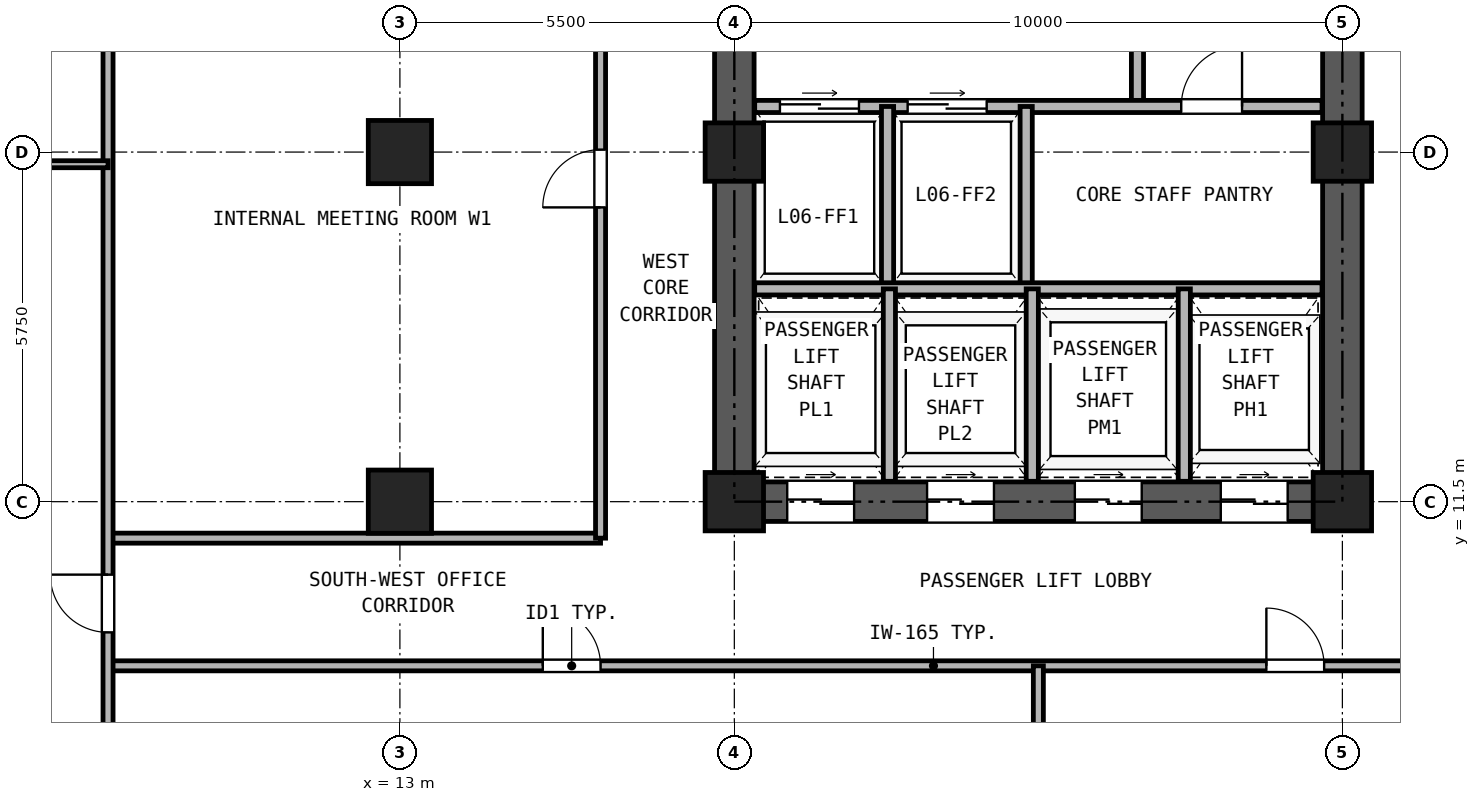
"""IFC4 building model, lengths in metres.
Left out: names, types, materials, properties, quantities, classifications, styles, units other than length and angle.
Written with IfcOpenShell. Run it as: python <this file> out.ifc"""

import sys

from ifc_helpers import new_model, si_unit, direction, frame, frame_2d, origin, origin_2d, place, context, subcontext, project, spatial, rectangle, hollow_rectangle, extrude, source, transform, mapped, element, fill, save


model = new_model("IFC4")
c1 = context("Model", 3, precision=1e-05, world=origin(), true_north=direction((0.0, 1.0)))
c2 = subcontext(c1, "Body", "Model", "MODEL_VIEW")
j1 = project(units=[si_unit("LENGTHUNIT", "METRE"), si_unit("PLANEANGLEUNIT", "RADIAN")], contexts=[c1])
p1 = place(None, origin())
s1 = spatial("IfcSite", under=j1, at=p1, CompositionType="ELEMENT")
p2 = place(p1, origin())
s2 = spatial("IfcBuilding", under=s1, at=p2, CompositionType="ELEMENT")
p3 = place(p2, frame((0.0, 0.0, 26.1)))
s3 = spatial("IfcBuildingStorey", under=s2, at=p3, CompositionType="ELEMENT", Elevation=26.1)
m1 = source(origin(), c2, "Body", "SweptSolid", [
    extrude(hollow_rectangle(XDim=1.04, YDim=1.04, WallThickness=0.065, at=origin_2d()), origin(), (0.0, 0.0, 1.0), 3.32),
])
for number, where, z_axis, x_axis in (
    (1, (13.0, 11.5, 0.0), (0.0, 0.0, 1.0), (1.0, 0.0, 0.0)),
    (2, (13.0, 17.25, 0.0), (0.0, 0.0, 1.0), (1.0, 0.0, 0.0)),
):
    element("IfcColumn", number, at=place(p3, frame(where, z_axis=z_axis, x_axis=x_axis)), inside=s3, PredefinedType="COLUMN", context=c2, shape_type="MappedRepresentation", body=[
        mapped(m1, transform((0.0, 0.0, 0.0), x_axis=(1.0, 0.0, 0.0), y_axis=(0.0, 1.0, 0.0), z_axis=(0.0, 0.0, 1.0), scale=1.0)),
    ])
m2 = source(origin(), c2, "Body", "SweptSolid", [
    extrude(hollow_rectangle(XDim=0.96, YDim=0.96, WallThickness=0.06, at=origin_2d()), origin(), (0.0, 0.0, 1.0), 3.32),
])
for number, where, z_axis, x_axis in (
    (3, (18.5, 11.5, 0.0), (0.0, 0.0, 1.0), (1.0, 0.0, 0.0)),
    (4, (18.5, 17.25, 0.0), (0.0, 0.0, 1.0), (1.0, 0.0, 0.0)),
    (5, (28.5, 11.5, 0.0), (0.0, 0.0, 1.0), (1.0, 0.0, 0.0)),
    (6, (28.5, 17.25, 0.0), (0.0, 0.0, 1.0), (1.0, 0.0, 0.0)),
):
    element("IfcColumn", number, at=place(p3, frame(where, z_axis=z_axis, x_axis=x_axis)), inside=s3, PredefinedType="COLUMN", context=c2, shape_type="MappedRepresentation", body=[
        mapped(m2, transform((0.0, 0.0, 0.0), x_axis=(1.0, 0.0, 0.0), y_axis=(0.0, 1.0, 0.0), z_axis=(0.0, 0.0, 1.0), scale=1.0)),
    ])
p4 = place(p3, frame((18.175, 11.5, 0.0), z_axis=(0.0, 0.0, 1.0), x_axis=(1.0, 0.0, 0.0)))
e7 = element("IfcWall", 7, at=p4, inside=s3, PredefinedType="SHEAR", context=c2, shape_type="SweptSolid", body=[
    extrude(rectangle(XDim=10.65, YDim=0.65, at=frame_2d((5.325, 0.0))), origin(), (0.0, 0.0, 1.0), 3.32),
])
p5 = place(p4, frame((1.195, 0.0, 0.0)))
e8 = element("IfcOpeningElement", 8, at=p5, cuts=e7, PredefinedType="OPENING", context=c2, shape_type="SweptSolid", body=[
    extrude(rectangle(XDim=1.1, YDim=2.25, at=frame_2d((0.55, 1.125))), frame((0.0, 0.335, 0.0), z_axis=(0.0, -1.0, 0.0), x_axis=(1.0, 0.0, 0.0)), (0.0, 0.0, 1.0), 0.67),
])
p6 = place(p4, frame((3.495, 0.0, 0.0)))
e9 = element("IfcOpeningElement", 9, at=p6, cuts=e7, PredefinedType="OPENING", context=c2, shape_type="SweptSolid", body=[
    extrude(rectangle(XDim=1.1, YDim=2.25, at=frame_2d((0.55, 1.125))), frame((0.0, 0.335, 0.0), z_axis=(0.0, -1.0, 0.0), x_axis=(1.0, 0.0, 0.0)), (0.0, 0.0, 1.0), 0.67),
])
p7 = place(p4, frame((5.925, 0.0, 0.0)))
e10 = element("IfcOpeningElement", 10, at=p7, cuts=e7, PredefinedType="OPENING", context=c2, shape_type="SweptSolid", body=[
    extrude(rectangle(XDim=1.1, YDim=2.25, at=frame_2d((0.55, 1.125))), frame((0.0, 0.335, 0.0), z_axis=(0.0, -1.0, 0.0), x_axis=(1.0, 0.0, 0.0)), (0.0, 0.0, 1.0), 0.67),
])
p8 = place(p4, frame((8.325, 0.0, 0.0)))
e11 = element("IfcOpeningElement", 11, at=p8, cuts=e7, PredefinedType="OPENING", context=c2, shape_type="SweptSolid", body=[
    extrude(rectangle(XDim=1.1, YDim=2.25, at=frame_2d((0.55, 1.125))), frame((0.0, 0.335, 0.0), z_axis=(0.0, -1.0, 0.0), x_axis=(1.0, 0.0, 0.0)), (0.0, 0.0, 1.0), 0.67),
])
p9 = place(p3, frame((18.5, 11.825, 0.0), z_axis=(0.0, 0.0, 1.0), x_axis=(0.0, 1.0, 0.0)))
e12 = element("IfcWall", 12, at=p9, inside=s3, PredefinedType="SHEAR", context=c2, shape_type="SweptSolid", body=[
    extrude(rectangle(XDim=16.6, YDim=0.65, at=frame_2d((8.3, 0.0))), origin(), (0.0, 0.0, 1.0), 3.32),
])
p10 = place(p9, frame((7.325, 0.0, 0.0)))
e13 = element("IfcOpeningElement", 13, at=p10, cuts=e12, PredefinedType="OPENING", context=c2, shape_type="SweptSolid", body=[
    extrude(rectangle(XDim=1.15, YDim=2.2, at=frame_2d((0.575, 1.1))), frame((0.0, 0.335, 0.0), z_axis=(0.0, -1.0, 0.0), x_axis=(1.0, 0.0, 0.0)), (0.0, 0.0, 1.0), 0.67),
])
p11 = place(p3, frame((28.5, 11.825, 0.0), z_axis=(0.0, 0.0, 1.0), x_axis=(0.0, 1.0, 0.0)))
e14 = element("IfcWall", 14, at=p11, inside=s3, PredefinedType="SHEAR", context=c2, shape_type="SweptSolid", body=[
    extrude(rectangle(XDim=16.6, YDim=0.65, at=frame_2d((8.3, 0.0))), origin(), (0.0, 0.0, 1.0), 3.32),
])
p12 = place(p11, frame((7.325, 0.0, 0.0)))
e15 = element("IfcOpeningElement", 15, at=p12, cuts=e14, PredefinedType="OPENING", context=c2, shape_type="SweptSolid", body=[
    extrude(rectangle(XDim=1.15, YDim=2.2, at=frame_2d((0.575, 1.1))), frame((0.0, 0.335, 0.0), z_axis=(0.0, -1.0, 0.0), x_axis=(1.0, 0.0, 0.0)), (0.0, 0.0, 1.0), 0.67),
])
p13 = place(p3, frame((25.13, 18.0, 0.0), z_axis=(0.0, 0.0, 1.0), x_axis=(0.0, 1.0, 0.0)))
e16 = element("IfcWall", 16, at=p13, inside=s3, PredefinedType="PARTITIONING", context=c2, shape_type="SweptSolid", body=[
    extrude(rectangle(XDim=3.39, YDim=0.2, at=frame_2d((1.695, 0.0))), origin(), (0.0, 0.0, 1.0), 3.32),
])
p14 = place(p13, frame((1.1, 0.0, 0.0)))
e17 = element("IfcOpeningElement", 17, at=p14, cuts=e16, PredefinedType="OPENING", context=c2, shape_type="SweptSolid", body=[
    extrude(rectangle(XDim=1.15, YDim=2.2, at=frame_2d((0.575, 1.1))), frame((0.0, 0.11, 0.0), z_axis=(0.0, -1.0, 0.0), x_axis=(1.0, 0.0, 0.0)), (0.0, 0.0, 1.0), 0.22),
])
p15 = place(p3, frame((18.835, 18.0, 0.0), z_axis=(0.0, 0.0, 1.0), x_axis=(1.0, 0.0, 0.0)))
e18 = element("IfcWall", 18, at=p15, inside=s3, PredefinedType="PARTITIONING", context=c2, shape_type="SweptSolid", body=[
    extrude(rectangle(XDim=9.33, YDim=0.2, at=frame_2d((4.665, 0.0))), origin(), (0.0, 0.0, 1.0), 3.32),
])
p16 = place(p15, frame((0.415, 0.0, 0.0)))
e19 = element("IfcOpeningElement", 19, at=p16, cuts=e18, PredefinedType="OPENING", context=c2, shape_type="SweptSolid", body=[
    extrude(rectangle(XDim=1.3, YDim=2.3, at=frame_2d((0.65, 1.15))), frame((0.0, 0.11, 0.0), z_axis=(0.0, -1.0, 0.0), x_axis=(1.0, 0.0, 0.0)), (0.0, 0.0, 1.0), 0.22),
])
p17 = place(p15, frame((2.515, 0.0, 0.0)))
e20 = element("IfcOpeningElement", 20, at=p17, cuts=e18, PredefinedType="OPENING", context=c2, shape_type="SweptSolid", body=[
    extrude(rectangle(XDim=1.3, YDim=2.3, at=frame_2d((0.65, 1.15))), frame((0.0, 0.11, 0.0), z_axis=(0.0, -1.0, 0.0), x_axis=(1.0, 0.0, 0.0)), (0.0, 0.0, 1.0), 0.22),
])
p18 = place(p15, frame((7.015, 0.0, 0.0)))
e21 = element("IfcOpeningElement", 21, at=p18, cuts=e18, PredefinedType="OPENING", context=c2, shape_type="SweptSolid", body=[
    extrude(rectangle(XDim=1.0, YDim=2.15, at=frame_2d((0.5, 1.075))), frame((0.0, 0.11, 0.0), z_axis=(0.0, -1.0, 0.0), x_axis=(1.0, 0.0, 0.0)), (0.0, 0.0, 1.0), 0.22),
])
for number, where, z_axis, x_axis in (
    (22, (21.02, 15.0, 0.0), (0.0, 0.0, 1.0), (0.0, 1.0, 0.0)),
    (23, (23.3, 15.0, 0.0), (0.0, 0.0, 1.0), (0.0, 1.0, 0.0)),
):
    element("IfcWall", number, at=place(p3, frame(where, z_axis=z_axis, x_axis=x_axis)), inside=s3, PredefinedType="PARTITIONING", context=c2, shape_type="SweptSolid", body=[
        extrude(rectangle(XDim=3.0, YDim=0.2, at=frame_2d((1.5, 0.0))), origin(), (0.0, 0.0, 1.0), 3.32),
    ])
p19 = place(p3, frame((18.835, 15.0, 0.0), z_axis=(0.0, 0.0, 1.0), x_axis=(1.0, 0.0, 0.0)))
e24 = element("IfcWall", 24, at=p19, inside=s3, PredefinedType="PARTITIONING", context=c2, shape_type="SweptSolid", body=[
    extrude(rectangle(XDim=9.33, YDim=0.2, at=frame_2d((4.665, 0.0))), origin(), (0.0, 0.0, 1.0), 3.32),
])
for number, where, z_axis, x_axis in (
    (25, (21.05, 11.835, 0.0), (0.0, 0.0, 1.0), (0.0, 1.0, 0.0)),
    (26, (23.4, 11.835, 0.0), (0.0, 0.0, 1.0), (0.0, 1.0, 0.0)),
    (27, (25.9, 11.835, 0.0), (0.0, 0.0, 1.0), (0.0, 1.0, 0.0)),
):
    element("IfcWall", number, at=place(p3, frame(where, z_axis=z_axis, x_axis=x_axis)), inside=s3, PredefinedType="PARTITIONING", context=c2, shape_type="SweptSolid", body=[
        extrude(rectangle(XDim=3.165, YDim=0.2, at=frame_2d((1.583, 0.0))), origin(), (0.0, 0.0, 1.0), 3.32),
    ])
p20 = place(p3, frame((8.2, 8.8, 0.0), z_axis=(0.0, 0.0, 1.0), x_axis=(1.0, 0.0, 0.0)))
e28 = element("IfcWall", 28, at=p20, inside=s3, PredefinedType="PARTITIONING", context=c2, shape_type="SweptSolid", body=[
    extrude(rectangle(XDim=30.6, YDim=0.165, at=frame_2d((15.3, 0.0))), origin(), (0.0, 0.0, 1.0), 3.32),
])
p21 = place(p20, frame((7.15, 0.0, 0.0)))
e29 = element("IfcOpeningElement", 29, at=p21, cuts=e28, PredefinedType="OPENING", context=c2, shape_type="SweptSolid", body=[
    extrude(rectangle(XDim=0.95, YDim=2.15, at=frame_2d((0.475, 1.075))), frame((0.0, 0.093, 0.0), z_axis=(0.0, -1.0, 0.0), x_axis=(1.0, 0.0, 0.0)), (0.0, 0.0, 1.0), 0.185),
])
p22 = place(p20, frame((19.05, 0.0, 0.0)))
e30 = element("IfcOpeningElement", 30, at=p22, cuts=e28, PredefinedType="OPENING", context=c2, shape_type="SweptSolid", body=[
    extrude(rectangle(XDim=0.95, YDim=2.15, at=frame_2d((0.475, 1.075))), frame((0.0, 0.093, 0.0), z_axis=(0.0, -1.0, 0.0), x_axis=(1.0, 0.0, 0.0)), (0.0, 0.0, 1.0), 0.185),
])
p23 = place(p20, frame((24.3, 0.0, 0.0)))
e31 = element("IfcOpeningElement", 31, at=p23, cuts=e28, PredefinedType="OPENING", context=c2, shape_type="SweptSolid", body=[
    extrude(rectangle(XDim=0.95, YDim=2.15, at=frame_2d((0.475, 1.075))), frame((0.0, 0.093, 0.0), z_axis=(0.0, -1.0, 0.0), x_axis=(1.0, 0.0, 0.0)), (0.0, 0.0, 1.0), 0.185),
])
p24 = place(p20, frame((26.5, 0.0, 0.0)))
e32 = element("IfcOpeningElement", 32, at=p24, cuts=e28, PredefinedType="OPENING", context=c2, shape_type="SweptSolid", body=[
    extrude(rectangle(XDim=0.92, YDim=2.1, at=frame_2d((0.46, 1.05))), frame((0.0, 0.093, 0.0), z_axis=(0.0, -1.0, 0.0), x_axis=(1.0, 0.0, 0.0)), (0.0, 0.0, 1.0), 0.185),
])
p25 = place(p20, frame((28.9, 0.0, 0.0)))
e33 = element("IfcOpeningElement", 33, at=p25, cuts=e28, PredefinedType="OPENING", context=c2, shape_type="SweptSolid", body=[
    extrude(rectangle(XDim=0.92, YDim=2.1, at=frame_2d((0.46, 1.05))), frame((0.0, 0.093, 0.0), z_axis=(0.0, -1.0, 0.0), x_axis=(1.0, 0.0, 0.0)), (0.0, 0.0, 1.0), 0.185),
])
p26 = place(p3, frame((8.2, 10.9, 0.0), z_axis=(0.0, 0.0, 1.0), x_axis=(1.0, 0.0, 0.0)))
e34 = element("IfcWall", 34, at=p26, inside=s3, PredefinedType="PARTITIONING", context=c2, shape_type="SweptSolid", body=[
    extrude(rectangle(XDim=8.1, YDim=0.165, at=frame_2d((4.05, 0.0))), origin(), (0.0, 0.0, 1.0), 3.32),
])
p27 = place(p3, frame((16.3, 10.9, 0.0), z_axis=(0.0, 0.0, 1.0), x_axis=(0.0, 1.0, 0.0)))
e35 = element("IfcWall", 35, at=p27, inside=s3, PredefinedType="PARTITIONING", context=c2, shape_type="SweptSolid", body=[
    extrude(rectangle(XDim=18.35, YDim=0.165, at=frame_2d((9.175, 0.0))), origin(), (0.0, 0.0, 1.0), 3.32),
])
p28 = place(p27, frame((5.44, 0.0, 0.0)))
e36 = element("IfcOpeningElement", 36, at=p28, cuts=e35, PredefinedType="OPENING", context=c2, shape_type="SweptSolid", body=[
    extrude(rectangle(XDim=0.95, YDim=2.15, at=frame_2d((0.475, 1.075))), frame((0.0, 0.093, 0.0), z_axis=(0.0, -1.0, 0.0), x_axis=(1.0, 0.0, 0.0)), (0.0, 0.0, 1.0), 0.185),
])
p29 = place(p27, frame((14.616, 0.0, 0.0)))
e37 = element("IfcOpeningElement", 37, at=p29, cuts=e35, PredefinedType="OPENING", context=c2, shape_type="SweptSolid", body=[
    extrude(rectangle(XDim=0.95, YDim=2.15, at=frame_2d((0.475, 1.075))), frame((0.0, 0.093, 0.0), z_axis=(0.0, -1.0, 0.0), x_axis=(1.0, 0.0, 0.0)), (0.0, 0.0, 1.0), 0.185),
])
p30 = place(p3, frame((8.2, 0.16, 0.0), z_axis=(0.0, 0.0, 1.0), x_axis=(0.0, 1.0, 0.0)))
e38 = element("IfcWall", 38, at=p30, inside=s3, PredefinedType="PARTITIONING", context=c2, shape_type="SweptSolid", body=[
    extrude(rectangle(XDim=40.18, YDim=0.165, at=frame_2d((20.09, 0.0))), origin(), (0.0, 0.0, 1.0), 3.32),
])
p31 = place(p30, frame((9.19, 0.0, 0.0)))
e39 = element("IfcOpeningElement", 39, at=p31, cuts=e38, PredefinedType="OPENING", context=c2, shape_type="SweptSolid", body=[
    extrude(rectangle(XDim=0.95, YDim=2.15, at=frame_2d((0.475, 1.075))), frame((0.0, 0.093, 0.0), z_axis=(0.0, -1.0, 0.0), x_axis=(1.0, 0.0, 0.0)), (0.0, 0.0, 1.0), 0.185),
])
p32 = place(p30, frame((29.64, 0.0, 0.0)))
e40 = element("IfcOpeningElement", 40, at=p32, cuts=e38, PredefinedType="OPENING", context=c2, shape_type="SweptSolid", body=[
    extrude(rectangle(XDim=0.95, YDim=2.15, at=frame_2d((0.475, 1.075))), frame((0.0, 0.093, 0.0), z_axis=(0.0, -1.0, 0.0), x_axis=(1.0, 0.0, 0.0)), (0.0, 0.0, 1.0), 0.185),
])
p33 = place(p3, frame((23.5, 0.16, 0.0), z_axis=(0.0, 0.0, 1.0), x_axis=(0.0, 1.0, 0.0)))
e41 = element("IfcWall", 41, at=p33, inside=s3, PredefinedType="PARTITIONING", context=c2, shape_type="SweptSolid", body=[
    extrude(rectangle(XDim=8.64, YDim=0.165, at=frame_2d((4.32, 0.0))), origin(), (0.0, 0.0, 1.0), 3.32),
])
p34 = place(p3, frame((0.16, 17.05, 0.0), z_axis=(0.0, 0.0, 1.0), x_axis=(1.0, 0.0, 0.0)))
e42 = element("IfcWall", 42, at=p34, inside=s3, PredefinedType="PARTITIONING", context=c2, shape_type="SweptSolid", body=[
    extrude(rectangle(XDim=8.04, YDim=0.115, at=frame_2d((4.02, 0.0))), origin(), (0.0, 0.0, 1.0), 2.539),
])
p35 = place(p16, origin())
e43 = element("IfcDoor", 43, at=p35, inside=s3, OperationType="DOUBLE_DOOR_SLIDING", PredefinedType="DOOR", context=c2, shape_type="SweptSolid", body=[
    extrude(rectangle(XDim=1.3, YDim=2.3, at=frame_2d((0.65, 1.15))), frame((0.0, 0.025, 0.0), z_axis=(0.0, -1.0, 0.0), x_axis=(1.0, 0.0, 0.0)), (0.0, 0.0, 1.0), 0.05),
])
fill(e19, e43)
p36 = place(p17, origin())
e44 = element("IfcDoor", 44, at=p36, inside=s3, OperationType="DOUBLE_DOOR_SLIDING", PredefinedType="DOOR", context=c2, shape_type="SweptSolid", body=[
    extrude(rectangle(XDim=1.3, YDim=2.3, at=frame_2d((0.65, 1.15))), frame((0.0, 0.025, 0.0), z_axis=(0.0, -1.0, 0.0), x_axis=(1.0, 0.0, 0.0)), (0.0, 0.0, 1.0), 0.05),
])
fill(e20, e44)
p37 = place(p18, frame((1.0, 0.0, 0.0), z_axis=(0.0, 0.0, 1.0), x_axis=(-1.0, 0.0, 0.0)))
e45 = element("IfcDoor", 45, at=p37, inside=s3, OperationType="SINGLE_SWING_RIGHT", PredefinedType="DOOR", context=c2, shape_type="SweptSolid", body=[
    extrude(rectangle(XDim=1.0, YDim=2.15, at=frame_2d((0.5, 1.075))), frame((0.0, 0.025, 0.0), z_axis=(0.0, -1.0, 0.0), x_axis=(1.0, 0.0, 0.0)), (0.0, 0.0, 1.0), 0.05),
])
fill(e21, e45)
p38 = place(p5, frame((1.1, 0.0, 0.0), z_axis=(0.0, 0.0, 1.0), x_axis=(-1.0, 0.0, 0.0)))
e46 = element("IfcDoor", 46, at=p38, inside=s3, OperationType="DOUBLE_DOOR_SLIDING", PredefinedType="DOOR", context=c2, shape_type="SweptSolid", body=[
    extrude(rectangle(XDim=1.1, YDim=2.25, at=frame_2d((0.55, 1.125))), frame((0.0, 0.025, 0.0), z_axis=(0.0, -1.0, 0.0), x_axis=(1.0, 0.0, 0.0)), (0.0, 0.0, 1.0), 0.05),
])
fill(e8, e46)
p39 = place(p6, frame((1.1, 0.0, 0.0), z_axis=(0.0, 0.0, 1.0), x_axis=(-1.0, 0.0, 0.0)))
e47 = element("IfcDoor", 47, at=p39, inside=s3, OperationType="DOUBLE_DOOR_SLIDING", PredefinedType="DOOR", context=c2, shape_type="SweptSolid", body=[
    extrude(rectangle(XDim=1.1, YDim=2.25, at=frame_2d((0.55, 1.125))), frame((0.0, 0.025, 0.0), z_axis=(0.0, -1.0, 0.0), x_axis=(1.0, 0.0, 0.0)), (0.0, 0.0, 1.0), 0.05),
])
fill(e9, e47)
p40 = place(p7, frame((1.1, 0.0, 0.0), z_axis=(0.0, 0.0, 1.0), x_axis=(-1.0, 0.0, 0.0)))
e48 = element("IfcDoor", 48, at=p40, inside=s3, OperationType="DOUBLE_DOOR_SLIDING", PredefinedType="DOOR", context=c2, shape_type="SweptSolid", body=[
    extrude(rectangle(XDim=1.1, YDim=2.25, at=frame_2d((0.55, 1.125))), frame((0.0, 0.025, 0.0), z_axis=(0.0, -1.0, 0.0), x_axis=(1.0, 0.0, 0.0)), (0.0, 0.0, 1.0), 0.05),
])
fill(e10, e48)
p41 = place(p8, frame((1.1, 0.0, 0.0), z_axis=(0.0, 0.0, 1.0), x_axis=(-1.0, 0.0, 0.0)))
e49 = element("IfcDoor", 49, at=p41, inside=s3, OperationType="DOUBLE_DOOR_SLIDING", PredefinedType="DOOR", context=c2, shape_type="SweptSolid", body=[
    extrude(rectangle(XDim=1.1, YDim=2.25, at=frame_2d((0.55, 1.125))), frame((0.0, 0.025, 0.0), z_axis=(0.0, -1.0, 0.0), x_axis=(1.0, 0.0, 0.0)), (0.0, 0.0, 1.0), 0.05),
])
fill(e11, e49)
p42 = place(p21, frame((0.95, 0.0, 0.0), z_axis=(0.0, 0.0, 1.0), x_axis=(-1.0, 0.0, 0.0)))
e50 = element("IfcDoor", 50, at=p42, inside=s3, OperationType="SINGLE_SWING_LEFT", PredefinedType="DOOR", context=c2, shape_type="SweptSolid", body=[
    extrude(rectangle(XDim=0.95, YDim=2.15, at=frame_2d((0.475, 1.075))), frame((0.0, 0.025, 0.0), z_axis=(0.0, -1.0, 0.0), x_axis=(1.0, 0.0, 0.0)), (0.0, 0.0, 1.0), 0.05),
])
fill(e29, e50)
p43 = place(p22, frame((0.95, 0.0, 0.0), z_axis=(0.0, 0.0, 1.0), x_axis=(-1.0, 0.0, 0.0)))
e51 = element("IfcDoor", 51, at=p43, inside=s3, OperationType="SINGLE_SWING_LEFT", PredefinedType="DOOR", context=c2, shape_type="SweptSolid", body=[
    extrude(rectangle(XDim=0.95, YDim=2.15, at=frame_2d((0.475, 1.075))), frame((0.0, 0.025, 0.0), z_axis=(0.0, -1.0, 0.0), x_axis=(1.0, 0.0, 0.0)), (0.0, 0.0, 1.0), 0.05),
])
fill(e30, e51)
p44 = place(p31, frame((0.95, 0.0, 0.0), z_axis=(0.0, 0.0, 1.0), x_axis=(-1.0, 0.0, 0.0)))
e52 = element("IfcDoor", 52, at=p44, inside=s3, OperationType="SINGLE_SWING_RIGHT", PredefinedType="DOOR", context=c2, shape_type="SweptSolid", body=[
    extrude(rectangle(XDim=0.95, YDim=2.15, at=frame_2d((0.475, 1.075))), frame((0.0, 0.025, 0.0), z_axis=(0.0, -1.0, 0.0), x_axis=(1.0, 0.0, 0.0)), (0.0, 0.0, 1.0), 0.05),
])
fill(e39, e52)
p45 = place(p28, frame((0.95, 0.0, 0.0), z_axis=(0.0, 0.0, 1.0), x_axis=(-1.0, 0.0, 0.0)))
e53 = element("IfcDoor", 53, at=p45, inside=s3, OperationType="SINGLE_SWING_LEFT", PredefinedType="DOOR", context=c2, shape_type="SweptSolid", body=[
    extrude(rectangle(XDim=0.95, YDim=2.15, at=frame_2d((0.475, 1.075))), frame((0.0, 0.025, 0.0), z_axis=(0.0, -1.0, 0.0), x_axis=(1.0, 0.0, 0.0)), (0.0, 0.0, 1.0), 0.05),
])
fill(e36, e53)
save(model, sys.argv[1])
